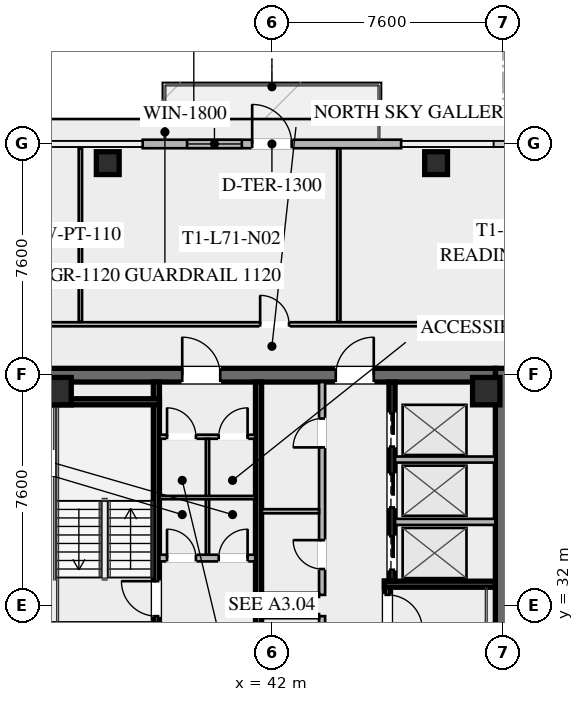
"""IFC4 building model, lengths in metres.
Left out: names, types, materials, properties, quantities, classifications, styles, units other than length and angle.
Written with IfcOpenShell. Run it as: python <this file> out.ifc"""

import sys

from ifc_helpers import new_model, si_unit, direction, frame, frame_2d, origin, origin_2d, place, context, subcontext, project, spatial, rectangle, hollow_rectangle, extrude, element, fill, save


model = new_model("IFC4")
c1 = context("Model", 3, precision=1e-05, world=origin(), true_north=direction((0.0, 1.0)))
c2 = subcontext(c1, "Body", "Model", "MODEL_VIEW")
j1 = project(units=[si_unit("LENGTHUNIT", "METRE"), si_unit("PLANEANGLEUNIT", "RADIAN")], contexts=[c1])
p1 = place(None, origin())
s1 = spatial("IfcSite", under=j1, at=p1, CompositionType="ELEMENT")
p2 = place(p1, origin())
s2 = spatial("IfcBuilding", under=s1, at=p2, CompositionType="ELEMENT")
p3 = place(p2, frame((0.0, 0.0, 263.4)))
s3 = spatial("IfcBuildingStorey", under=s2, at=p3, CompositionType="ELEMENT", Elevation=263.4)
p4 = place(p3, frame((49.575, 39.8, 0.0), z_axis=(0.0, 0.0, 1.0), x_axis=(0.0, -1.0, 0.0)))
e1 = element("IfcWall", 1, at=p4, inside=s3, PredefinedType="SHEAR", context=c2, shape_type="SweptSolid", body=[
    extrude(rectangle(XDim=15.6, YDim=0.45, at=frame_2d((7.8, 0.0))), origin(), (0.0, 0.0, 1.0), 3.55),
])
p5 = place(p3, frame((34.65, 39.575, 0.0), z_axis=(0.0, 0.0, 1.0), x_axis=(1.0, 0.0, 0.0)))
e2 = element("IfcWall", 2, at=p5, inside=s3, PredefinedType="SHEAR", context=c2, shape_type="SweptSolid", body=[
    extrude(rectangle(XDim=14.7, YDim=0.45, at=frame_2d((7.35, 0.0))), origin(), (0.0, 0.0, 1.0), 3.55),
])
p6 = place(p5, frame((4.4, 0.0, 0.0)))
e3 = element("IfcOpeningElement", 3, at=p6, cuts=e2, PredefinedType="OPENING", context=c2, shape_type="SweptSolid", body=[
    extrude(rectangle(XDim=1.25, YDim=2.25, at=frame_2d((0.625, 1.125))), frame((0.0, 0.235, 0.0), z_axis=(0.0, -1.0, 0.0), x_axis=(1.0, 0.0, 0.0)), (0.0, 0.0, 1.0), 0.47),
])
p7 = place(p5, frame((9.45, 0.0, 0.0)))
e4 = element("IfcOpeningElement", 4, at=p7, cuts=e2, PredefinedType="OPENING", context=c2, shape_type="SweptSolid", body=[
    extrude(rectangle(XDim=1.25, YDim=2.25, at=frame_2d((0.625, 1.125))), frame((0.0, 0.235, 0.0), z_axis=(0.0, -1.0, 0.0), x_axis=(1.0, 0.0, 0.0)), (0.0, 0.0, 1.0), 0.47),
])
for number, where, z_axis, x_axis in (
    (5, (49.05, 39.05, 0.0), (0.0, 0.0, 1.0), (1.0, 0.0, 0.0)),
    (6, (34.95, 39.05, 0.0), (0.0, 0.0, 1.0), (1.0, 0.0, 0.0)),
):
    element("IfcColumn", number, at=place(p3, frame(where, z_axis=z_axis, x_axis=x_axis)), inside=s3, PredefinedType="COLUMN", context=c2, shape_type="SweptSolid", body=[
        extrude(hollow_rectangle(XDim=0.9, YDim=0.9, WallThickness=0.04, at=origin_2d()), origin(), (0.0, 0.0, 1.0), 3.37),
    ])
for number, where, z_axis, x_axis in (
    (7, (47.4, 46.55, -0.295), (0.0, 0.0, 1.0), (1.0, 0.0, 0.0)),
    (8, (36.6, 46.55, -0.295), (0.0, 0.0, 1.0), (1.0, 0.0, 0.0)),
):
    element("IfcColumn", number, at=place(p3, frame(where, z_axis=z_axis, x_axis=x_axis)), inside=s3, PredefinedType="COLUMN", context=c2, shape_type="SweptSolid", body=[
        extrude(hollow_rectangle(XDim=0.75, YDim=0.75, WallThickness=0.032, at=origin_2d()), origin(), (0.0, 0.0, 1.0), 3.665),
    ])
p8 = place(p3, frame((37.75, 47.18, 0.0), z_axis=(0.0, 0.0, 1.0), x_axis=(1.0, 0.0, 0.0)))
e9 = element("IfcWall", 9, at=p8, inside=s3, PredefinedType="SOLIDWALL", context=c2, shape_type="SweptSolid", body=[
    extrude(rectangle(XDim=8.5, YDim=0.28, at=frame_2d((4.25, 0.0))), origin(), (0.0, 0.0, 1.0), 3.37),
])
p9 = place(p8, frame((3.6, 0.0, 0.0)))
e10 = element("IfcOpeningElement", 10, at=p9, cuts=e9, PredefinedType="OPENING", context=c2, shape_type="SweptSolid", body=[
    extrude(rectangle(XDim=1.3, YDim=2.15, at=frame_2d((0.65, 1.075))), frame((0.0, 0.15, 0.0), z_axis=(0.0, -1.0, 0.0), x_axis=(1.0, 0.0, 0.0)), (0.0, 0.0, 1.0), 0.3),
])
p10 = place(p8, frame((1.46, 0.0, 0.85)))
e11 = element("IfcOpeningElement", 11, at=p10, cuts=e9, PredefinedType="OPENING", context=c2, shape_type="SweptSolid", body=[
    extrude(rectangle(XDim=1.8, YDim=1.92, at=frame_2d((0.9, 0.96))), frame((0.0, 0.15, 0.0), z_axis=(0.0, -1.0, 0.0), x_axis=(1.0, 0.0, 0.0)), (0.0, 0.0, 1.0), 0.3),
])
p11 = place(p3, frame((38.2, 31.2, 0.0), z_axis=(0.0, 0.0, 1.0), x_axis=(0.0, 1.0, 0.0)))
e12 = element("IfcWall", 12, at=p11, inside=s3, PredefinedType="SHEAR", context=c2, shape_type="SweptSolid", body=[
    extrude(rectangle(XDim=8.15, YDim=0.2, at=frame_2d((4.075, 0.0))), origin(), (0.0, 0.0, 1.0), 3.37),
])
p12 = place(p11, frame((0.45, 0.0, 0.0)))
e13 = element("IfcOpeningElement", 13, at=p12, cuts=e12, PredefinedType="OPENING", context=c2, shape_type="SweptSolid", body=[
    extrude(rectangle(XDim=1.15, YDim=2.2, at=frame_2d((0.575, 1.1))), frame((0.0, 0.11, 0.0), z_axis=(0.0, -1.0, 0.0), x_axis=(1.0, 0.0, 0.0)), (0.0, 0.0, 1.0), 0.22),
])
p13 = place(p3, frame((34.65, 38.7, 0.0), z_axis=(0.0, 0.0, 1.0), x_axis=(1.0, 0.0, 0.0)))
e14 = element("IfcWall", 14, at=p13, inside=s3, PredefinedType="SHEAR", context=c2, shape_type="SweptSolid", body=[
    extrude(rectangle(XDim=3.65, YDim=0.2, at=frame_2d((1.825, 0.0))), origin(), (0.0, 0.0, 1.0), 3.37),
])
p14 = place(p3, frame((45.8, 32.8, 0.0), z_axis=(0.0, 0.0, 1.0), x_axis=(0.0, -1.0, 0.0)))
e15 = element("IfcWall", 15, at=p14, inside=s3, PredefinedType="SHEAR", context=c2, shape_type="SweptSolid", body=[
    extrude(rectangle(XDim=8.15, YDim=0.2, at=frame_2d((4.075, 0.0))), origin(), (0.0, 0.0, 1.0), 3.37),
])
p15 = place(p14, frame((0.45, 0.0, 0.0)))
e16 = element("IfcOpeningElement", 16, at=p15, cuts=e15, PredefinedType="OPENING", context=c2, shape_type="SweptSolid", body=[
    extrude(rectangle(XDim=1.15, YDim=2.2, at=frame_2d((0.575, 1.1))), frame((0.0, 0.11, 0.0), z_axis=(0.0, -1.0, 0.0), x_axis=(1.0, 0.0, 0.0)), (0.0, 0.0, 1.0), 0.22),
])
p16 = place(p3, frame((45.7, 32.7, 0.0), z_axis=(0.0, 0.0, 1.0), x_axis=(1.0, 0.0, 0.0)))
e17 = element("IfcWall", 17, at=p16, inside=s3, PredefinedType="SHEAR", context=c2, shape_type="SweptSolid", body=[
    extrude(rectangle(XDim=3.65, YDim=0.2, at=frame_2d((1.825, 0.0))), origin(), (0.0, 0.0, 1.0), 3.37),
])
p17 = place(p3, frame((41.56, 24.65, 0.0), z_axis=(0.0, 0.0, 1.0), x_axis=(0.0, 1.0, 0.0)))
e18 = element("IfcWall", 18, at=p17, inside=s3, PredefinedType="SHEAR", context=c2, shape_type="SweptSolid", body=[
    extrude(rectangle(XDim=14.7, YDim=0.2, at=frame_2d((7.35, 0.0))), origin(), (0.0, 0.0, 1.0), 3.37),
])
p18 = place(p3, frame((38.3, 33.56, 0.0), z_axis=(0.0, 0.0, 1.0), x_axis=(1.0, 0.0, 0.0)))
e19 = element("IfcWall", 19, at=p18, inside=s3, PredefinedType="SOLIDWALL", context=c2, shape_type="SweptSolid", body=[
    extrude(rectangle(XDim=3.15, YDim=0.22, at=frame_2d((1.575, 0.0))), origin(), (0.0, 0.0, 1.0), 2.723),
])
p19 = place(p18, frame((0.25, 0.0, 0.0)))
e20 = element("IfcOpeningElement", 20, at=p19, cuts=e19, PredefinedType="OPENING", context=c2, shape_type="SweptSolid", body=[
    extrude(rectangle(XDim=0.95, YDim=2.05, at=frame_2d((0.475, 1.025))), frame((0.0, 0.12, 0.0), z_axis=(0.0, -1.0, 0.0), x_axis=(1.0, 0.0, 0.0)), (0.0, 0.0, 1.0), 0.24),
])
p20 = place(p18, frame((1.95, 0.0, 0.0)))
e21 = element("IfcOpeningElement", 21, at=p20, cuts=e19, PredefinedType="OPENING", context=c2, shape_type="SweptSolid", body=[
    extrude(rectangle(XDim=0.95, YDim=2.05, at=frame_2d((0.475, 1.025))), frame((0.0, 0.12, 0.0), z_axis=(0.0, -1.0, 0.0), x_axis=(1.0, 0.0, 0.0)), (0.0, 0.0, 1.0), 0.24),
])
p21 = place(p3, frame((45.95, 39.35, 0.0), z_axis=(0.0, 0.0, 1.0), x_axis=(0.0, -1.0, 0.0)))
e22 = element("IfcWall", 22, at=p21, inside=s3, PredefinedType="SHEAR", context=c2, shape_type="SweptSolid", body=[
    extrude(rectangle(XDim=6.55, YDim=0.2, at=frame_2d((3.275, 0.0))), origin(), (0.0, 0.0, 1.0), 3.37),
])
p22 = place(p21, frame((5.075, 0.0, 0.0)))
e23 = element("IfcOpeningElement", 23, at=p22, cuts=e22, PredefinedType="OPENING", context=c2, shape_type="SweptSolid", body=[
    extrude(rectangle(XDim=1.1, YDim=2.2, at=frame_2d((0.55, 1.1))), frame((0.0, 0.11, 0.0), z_axis=(0.0, -1.0, 0.0), x_axis=(1.0, 0.0, 0.0)), (0.0, 0.0, 1.0), 0.22),
])
p23 = place(p21, frame((3.025, 0.0, 0.0)))
e24 = element("IfcOpeningElement", 24, at=p23, cuts=e22, PredefinedType="OPENING", context=c2, shape_type="SweptSolid", body=[
    extrude(rectangle(XDim=1.1, YDim=2.2, at=frame_2d((0.55, 1.1))), frame((0.0, 0.11, 0.0), z_axis=(0.0, -1.0, 0.0), x_axis=(1.0, 0.0, 0.0)), (0.0, 0.0, 1.0), 0.22),
])
p24 = place(p21, frame((1.025, 0.0, 0.0)))
e25 = element("IfcOpeningElement", 25, at=p24, cuts=e22, PredefinedType="OPENING", context=c2, shape_type="SweptSolid", body=[
    extrude(rectangle(XDim=1.1, YDim=2.2, at=frame_2d((0.55, 1.1))), frame((0.0, 0.11, 0.0), z_axis=(0.0, -1.0, 0.0), x_axis=(1.0, 0.0, 0.0)), (0.0, 0.0, 1.0), 0.22),
])
for number, where, z_axis, x_axis in (
    (26, (46.05, 34.75, 0.0), (0.0, 0.0, 1.0), (1.0, 0.0, 0.0)),
    (27, (46.05, 36.8, 0.0), (0.0, 0.0, 1.0), (1.0, 0.0, 0.0)),
):
    element("IfcWall", number, at=place(p3, frame(where, z_axis=z_axis, x_axis=x_axis)), inside=s3, PredefinedType="SOLIDWALL", context=c2, shape_type="SweptSolid", body=[
        extrude(rectangle(XDim=3.3, YDim=0.2, at=frame_2d((1.65, 0.0))), origin(), (0.0, 0.0, 1.0), 3.37),
    ])
p25 = place(p3, frame((38.3, 37.55, 0.0), z_axis=(0.0, 0.0, 1.0), x_axis=(1.0, 0.0, 0.0)))
e28 = element("IfcWall", 28, at=p25, inside=s3, PredefinedType="PARTITIONING", context=c2, shape_type="SweptSolid", body=[
    extrude(rectangle(XDim=3.15, YDim=0.135, at=frame_2d((1.575, 0.0))), origin(), (0.0, 0.0, 1.0), 2.723),
])
p26 = place(p25, frame((0.25, 0.0, 0.0)))
e29 = element("IfcOpeningElement", 29, at=p26, cuts=e28, PredefinedType="OPENING", context=c2, shape_type="SweptSolid", body=[
    extrude(rectangle(XDim=0.95, YDim=2.05, at=frame_2d((0.475, 1.025))), frame((0.0, 0.077, 0.0), z_axis=(0.0, -1.0, 0.0), x_axis=(1.0, 0.0, 0.0)), (0.0, 0.0, 1.0), 0.155),
])
p27 = place(p25, frame((1.95, 0.0, 0.0)))
e30 = element("IfcOpeningElement", 30, at=p27, cuts=e28, PredefinedType="OPENING", context=c2, shape_type="SweptSolid", body=[
    extrude(rectangle(XDim=0.95, YDim=2.05, at=frame_2d((0.475, 1.025))), frame((0.0, 0.077, 0.0), z_axis=(0.0, -1.0, 0.0), x_axis=(1.0, 0.0, 0.0)), (0.0, 0.0, 1.0), 0.155),
])
p28 = place(p3, frame((39.88, 33.68, 0.0), z_axis=(0.0, 0.0, 1.0), x_axis=(0.0, 1.0, 0.0)))
e31 = element("IfcWall", 31, at=p28, inside=s3, PredefinedType="PARTITIONING", context=c2, shape_type="SweptSolid", body=[
    extrude(rectangle(XDim=3.8, YDim=0.11, at=frame_2d((1.9, 0.0))), origin(), (0.0, 0.0, 1.0), 2.723),
])
p29 = place(p3, frame((38.3, 35.55, 0.0), z_axis=(0.0, 0.0, 1.0), x_axis=(1.0, 0.0, 0.0)))
e32 = element("IfcWall", 32, at=p29, inside=s3, PredefinedType="PARTITIONING", context=c2, shape_type="SweptSolid", body=[
    extrude(rectangle(XDim=3.15, YDim=0.11, at=frame_2d((1.575, 0.0))), origin(), (0.0, 0.0, 1.0), 2.723),
])
p30 = place(p3, frame((43.65, 24.65, 0.0), z_axis=(0.0, 0.0, 1.0), x_axis=(0.0, 1.0, 0.0)))
e33 = element("IfcWall", 33, at=p30, inside=s3, PredefinedType="SOLIDWALL", context=c2, shape_type="SweptSolid", body=[
    extrude(rectangle(XDim=7.0, YDim=0.2, at=frame_2d((3.5, 0.0))), origin(), (0.0, 0.0, 1.0), 2.723),
])
p31 = place(p30, frame((0.85, 0.0, 0.0)))
e34 = element("IfcOpeningElement", 34, at=p31, cuts=e33, PredefinedType="OPENING", context=c2, shape_type="SweptSolid", body=[
    extrude(rectangle(XDim=0.95, YDim=2.05, at=frame_2d((0.475, 1.025))), frame((0.0, 0.11, 0.0), z_axis=(0.0, -1.0, 0.0), x_axis=(1.0, 0.0, 0.0)), (0.0, 0.0, 1.0), 0.22),
])
p32 = place(p30, frame((4.8, 0.0, 0.0)))
e35 = element("IfcOpeningElement", 35, at=p32, cuts=e33, PredefinedType="OPENING", context=c2, shape_type="SweptSolid", body=[
    extrude(rectangle(XDim=1.05, YDim=2.2, at=frame_2d((0.525, 1.1))), frame((0.0, 0.11, 0.0), z_axis=(0.0, -1.0, 0.0), x_axis=(1.0, 0.0, 0.0)), (0.0, 0.0, 1.0), 0.22),
])
p33 = place(p3, frame((41.67, 31.65, 0.0), z_axis=(0.0, 0.0, 1.0), x_axis=(1.0, 0.0, 0.0)))
e36 = element("IfcWall", 36, at=p33, inside=s3, PredefinedType="PARTITIONING", context=c2, shape_type="SweptSolid", body=[
    extrude(rectangle(XDim=1.88, YDim=0.135, at=frame_2d((0.94, 0.0))), origin(), (0.0, 0.0, 1.0), 2.723),
])
p34 = place(p3, frame((43.65, 32.35, 0.0), z_axis=(0.0, 0.0, 1.0), x_axis=(0.0, 1.0, 0.0)))
e37 = element("IfcWall", 37, at=p34, inside=s3, PredefinedType="SOLIDWALL", context=c2, shape_type="SweptSolid", body=[
    extrude(rectangle(XDim=7.0, YDim=0.2, at=frame_2d((3.5, 0.0))), origin(), (0.0, 0.0, 1.0), 2.723),
])
p35 = place(p34, frame((0.85, 0.0, 0.0)))
e38 = element("IfcOpeningElement", 38, at=p35, cuts=e37, PredefinedType="OPENING", context=c2, shape_type="SweptSolid", body=[
    extrude(rectangle(XDim=0.95, YDim=2.05, at=frame_2d((0.475, 1.025))), frame((0.0, 0.11, 0.0), z_axis=(0.0, -1.0, 0.0), x_axis=(1.0, 0.0, 0.0)), (0.0, 0.0, 1.0), 0.22),
])
p36 = place(p34, frame((4.85, 0.0, 0.0)))
e39 = element("IfcOpeningElement", 39, at=p36, cuts=e37, PredefinedType="OPENING", context=c2, shape_type="SweptSolid", body=[
    extrude(rectangle(XDim=0.95, YDim=2.05, at=frame_2d((0.475, 1.025))), frame((0.0, 0.11, 0.0), z_axis=(0.0, -1.0, 0.0), x_axis=(1.0, 0.0, 0.0)), (0.0, 0.0, 1.0), 0.22),
])
for number, where, z_axis, x_axis in (
    (40, (41.67, 32.35, 0.0), (0.0, 0.0, 1.0), (1.0, 0.0, 0.0)),
    (41, (41.67, 35.1, 0.0), (0.0, 0.0, 1.0), (1.0, 0.0, 0.0)),
):
    element("IfcWall", number, at=place(p3, frame(where, z_axis=z_axis, x_axis=x_axis)), inside=s3, PredefinedType="PARTITIONING", context=c2, shape_type="SweptSolid", body=[
        extrude(rectangle(XDim=1.88, YDim=0.135, at=frame_2d((0.94, 0.0))), origin(), (0.0, 0.0, 1.0), 2.723),
    ])
p37 = place(p3, frame((28.85, 41.25, 0.0), z_axis=(0.0, 0.0, 1.0), x_axis=(1.0, 0.0, 0.0)))
e42 = element("IfcWall", 42, at=p37, inside=s3, PredefinedType="PARTITIONING", context=c2, shape_type="SweptSolid", body=[
    extrude(rectangle(XDim=26.3, YDim=0.135, at=frame_2d((13.15, 0.0))), origin(), (0.0, 0.0, 1.0), 2.723),
])
p38 = place(p37, frame((0.3, 0.0, 0.0)))
e43 = element("IfcOpeningElement", 43, at=p38, cuts=e42, PredefinedType="OPENING", context=c2, shape_type="SweptSolid", body=[
    extrude(rectangle(XDim=0.95, YDim=2.05, at=frame_2d((0.475, 1.025))), frame((0.0, 0.077, 0.0), z_axis=(0.0, -1.0, 0.0), x_axis=(1.0, 0.0, 0.0)), (0.0, 0.0, 1.0), 0.155),
])
p39 = place(p37, frame((12.763, 0.0, 0.0)))
e44 = element("IfcOpeningElement", 44, at=p39, cuts=e42, PredefinedType="OPENING", context=c2, shape_type="SweptSolid", body=[
    extrude(rectangle(XDim=0.95, YDim=2.05, at=frame_2d((0.475, 1.025))), frame((0.0, 0.077, 0.0), z_axis=(0.0, -1.0, 0.0), x_axis=(1.0, 0.0, 0.0)), (0.0, 0.0, 1.0), 0.155),
])
p40 = place(p37, frame((25.05, 0.0, 0.0)))
e45 = element("IfcOpeningElement", 45, at=p40, cuts=e42, PredefinedType="OPENING", context=c2, shape_type="SweptSolid", body=[
    extrude(rectangle(XDim=0.95, YDim=2.05, at=frame_2d((0.475, 1.025))), frame((0.0, 0.077, 0.0), z_axis=(0.0, -1.0, 0.0), x_axis=(1.0, 0.0, 0.0)), (0.0, 0.0, 1.0), 0.155),
])
for number, where, z_axis, x_axis in (
    (46, (35.7, 41.33, 0.0), (0.0, 0.0, 1.0), (0.0, 1.0, 0.0)),
    (47, (44.2, 41.33, 0.0), (0.0, 0.0, 1.0), (0.0, 1.0, 0.0)),
):
    element("IfcWall", number, at=place(p3, frame(where, z_axis=z_axis, x_axis=x_axis)), inside=s3, PredefinedType="PARTITIONING", context=c2, shape_type="SweptSolid", body=[
        extrude(rectangle(XDim=5.7, YDim=0.11, at=frame_2d((2.85, 0.0))), origin(), (0.0, 0.0, 1.0), 2.723),
    ])
p41 = place(p9, origin())
e48 = element("IfcDoor", 48, at=p41, inside=s3, OperationType="SINGLE_SWING_LEFT", PredefinedType="DOOR", context=c2, shape_type="SweptSolid", body=[
    extrude(rectangle(XDim=1.3, YDim=2.15, at=frame_2d((0.65, 1.075))), frame((0.0, 0.025, 0.0), z_axis=(0.0, -1.0, 0.0), x_axis=(1.0, 0.0, 0.0)), (0.0, 0.0, 1.0), 0.05),
])
fill(e10, e48)
p42 = place(p10, origin())
e49 = element("IfcWindow", 49, at=p42, inside=s3, PartitioningType="SINGLE_PANEL", PredefinedType="WINDOW", context=c2, shape_type="SweptSolid", body=[
    extrude(rectangle(XDim=1.8, YDim=1.92, at=frame_2d((0.9, 0.96))), frame((0.0, 0.03, 0.0), z_axis=(0.0, -1.0, 0.0), x_axis=(1.0, 0.0, 0.0)), (0.0, 0.0, 1.0), 0.06),
])
fill(e11, e49)
p43 = place(p6, origin())
e50 = element("IfcDoor", 50, at=p43, inside=s3, OperationType="SINGLE_SWING_LEFT", PredefinedType="DOOR", context=c2, shape_type="SweptSolid", body=[
    extrude(rectangle(XDim=1.25, YDim=2.25, at=frame_2d((0.625, 1.125))), frame((0.0, 0.025, 0.0), z_axis=(0.0, -1.0, 0.0), x_axis=(1.0, 0.0, 0.0)), (0.0, 0.0, 1.0), 0.05),
])
fill(e3, e50)
p44 = place(p7, origin())
e51 = element("IfcDoor", 51, at=p44, inside=s3, OperationType="SINGLE_SWING_RIGHT", PredefinedType="DOOR", context=c2, shape_type="SweptSolid", body=[
    extrude(rectangle(XDim=1.25, YDim=2.25, at=frame_2d((0.625, 1.125))), frame((0.0, 0.025, 0.0), z_axis=(0.0, -1.0, 0.0), x_axis=(1.0, 0.0, 0.0)), (0.0, 0.0, 1.0), 0.05),
])
fill(e4, e51)
p45 = place(p12, origin())
e52 = element("IfcDoor", 52, at=p45, inside=s3, OperationType="SINGLE_SWING_RIGHT", PredefinedType="DOOR", context=c2, shape_type="SweptSolid", body=[
    extrude(rectangle(XDim=1.15, YDim=2.2, at=frame_2d((0.575, 1.1))), frame((0.0, 0.025, 0.0), z_axis=(0.0, -1.0, 0.0), x_axis=(1.0, 0.0, 0.0)), (0.0, 0.0, 1.0), 0.05),
])
fill(e13, e52)
p46 = place(p15, origin())
e53 = element("IfcDoor", 53, at=p46, inside=s3, OperationType="SINGLE_SWING_RIGHT", PredefinedType="DOOR", context=c2, shape_type="SweptSolid", body=[
    extrude(rectangle(XDim=1.15, YDim=2.2, at=frame_2d((0.575, 1.1))), frame((0.0, 0.025, 0.0), z_axis=(0.0, -1.0, 0.0), x_axis=(1.0, 0.0, 0.0)), (0.0, 0.0, 1.0), 0.05),
])
fill(e16, e53)
p47 = place(p26, origin())
e54 = element("IfcDoor", 54, at=p47, inside=s3, OperationType="SINGLE_SWING_LEFT", PredefinedType="DOOR", context=c2, shape_type="SweptSolid", body=[
    extrude(rectangle(XDim=0.95, YDim=2.05, at=frame_2d((0.475, 1.025))), frame((0.0, 0.025, 0.0), z_axis=(0.0, -1.0, 0.0), x_axis=(1.0, 0.0, 0.0)), (0.0, 0.0, 1.0), 0.05),
])
fill(e29, e54)
p48 = place(p27, origin())
e55 = element("IfcDoor", 55, at=p48, inside=s3, OperationType="SINGLE_SWING_RIGHT", PredefinedType="DOOR", context=c2, shape_type="SweptSolid", body=[
    extrude(rectangle(XDim=0.95, YDim=2.05, at=frame_2d((0.475, 1.025))), frame((0.0, 0.025, 0.0), z_axis=(0.0, -1.0, 0.0), x_axis=(1.0, 0.0, 0.0)), (0.0, 0.0, 1.0), 0.05),
])
fill(e30, e55)
p49 = place(p19, origin())
e56 = element("IfcDoor", 56, at=p49, inside=s3, OperationType="SINGLE_SWING_LEFT", PredefinedType="DOOR", context=c2, shape_type="SweptSolid", body=[
    extrude(rectangle(XDim=0.95, YDim=2.05, at=frame_2d((0.475, 1.025))), frame((0.0, 0.025, 0.0), z_axis=(0.0, -1.0, 0.0), x_axis=(1.0, 0.0, 0.0)), (0.0, 0.0, 1.0), 0.05),
])
fill(e20, e56)
p50 = place(p20, origin())
e57 = element("IfcDoor", 57, at=p50, inside=s3, OperationType="SINGLE_SWING_RIGHT", PredefinedType="DOOR", context=c2, shape_type="SweptSolid", body=[
    extrude(rectangle(XDim=0.95, YDim=2.05, at=frame_2d((0.475, 1.025))), frame((0.0, 0.025, 0.0), z_axis=(0.0, -1.0, 0.0), x_axis=(1.0, 0.0, 0.0)), (0.0, 0.0, 1.0), 0.05),
])
fill(e21, e57)
p51 = place(p35, origin())
e58 = element("IfcDoor", 58, at=p51, inside=s3, OperationType="SINGLE_SWING_RIGHT", PredefinedType="DOOR", context=c2, shape_type="SweptSolid", body=[
    extrude(rectangle(XDim=0.95, YDim=2.05, at=frame_2d((0.475, 1.025))), frame((0.0, 0.025, 0.0), z_axis=(0.0, -1.0, 0.0), x_axis=(1.0, 0.0, 0.0)), (0.0, 0.0, 1.0), 0.05),
])
fill(e38, e58)
p52 = place(p36, origin())
e59 = element("IfcDoor", 59, at=p52, inside=s3, OperationType="SINGLE_SWING_LEFT", PredefinedType="DOOR", context=c2, shape_type="SweptSolid", body=[
    extrude(rectangle(XDim=0.95, YDim=2.05, at=frame_2d((0.475, 1.025))), frame((0.0, 0.025, 0.0), z_axis=(0.0, -1.0, 0.0), x_axis=(1.0, 0.0, 0.0)), (0.0, 0.0, 1.0), 0.05),
])
fill(e39, e59)
p53 = place(p39, origin())
e60 = element("IfcDoor", 60, at=p53, inside=s3, OperationType="SINGLE_SWING_LEFT", PredefinedType="DOOR", context=c2, shape_type="SweptSolid", body=[
    extrude(rectangle(XDim=0.95, YDim=2.05, at=frame_2d((0.475, 1.025))), frame((0.0, 0.025, 0.0), z_axis=(0.0, -1.0, 0.0), x_axis=(1.0, 0.0, 0.0)), (0.0, 0.0, 1.0), 0.05),
])
fill(e44, e60)
p54 = place(p22, origin())
e61 = element("IfcDoor", 61, at=p54, inside=s3, OperationType="SLIDING_TO_LEFT", PredefinedType="DOOR", context=c2, shape_type="SweptSolid", body=[
    extrude(rectangle(XDim=1.1, YDim=2.2, at=frame_2d((0.55, 1.1))), frame((0.0, 0.025, 0.0), z_axis=(0.0, -1.0, 0.0), x_axis=(1.0, 0.0, 0.0)), (0.0, 0.0, 1.0), 0.05),
])
fill(e23, e61)
p55 = place(p23, origin())
e62 = element("IfcDoor", 62, at=p55, inside=s3, OperationType="SLIDING_TO_LEFT", PredefinedType="DOOR", context=c2, shape_type="SweptSolid", body=[
    extrude(rectangle(XDim=1.1, YDim=2.2, at=frame_2d((0.55, 1.1))), frame((0.0, 0.025, 0.0), z_axis=(0.0, -1.0, 0.0), x_axis=(1.0, 0.0, 0.0)), (0.0, 0.0, 1.0), 0.05),
])
fill(e24, e62)
p56 = place(p24, origin())
e63 = element("IfcDoor", 63, at=p56, inside=s3, OperationType="SLIDING_TO_LEFT", PredefinedType="DOOR", context=c2, shape_type="SweptSolid", body=[
    extrude(rectangle(XDim=1.1, YDim=2.2, at=frame_2d((0.55, 1.1))), frame((0.0, 0.025, 0.0), z_axis=(0.0, -1.0, 0.0), x_axis=(1.0, 0.0, 0.0)), (0.0, 0.0, 1.0), 0.05),
])
fill(e25, e63)
save(model, sys.argv[1])
